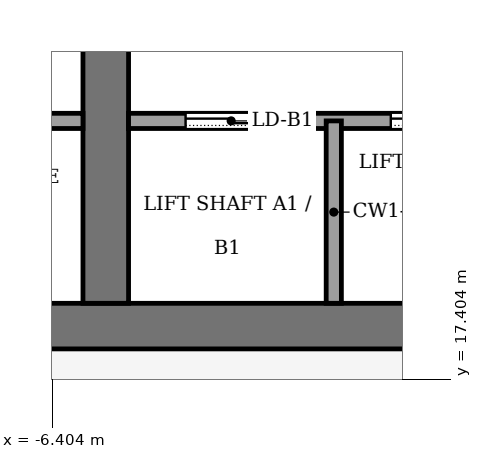
"""IFC4 building model, lengths in metres.
Left out: names, types, materials, properties, quantities, classifications, styles, units other than length and angle.
Written with IfcOpenShell. Run it as: python <this file> out.ifc"""

import sys

from ifc_helpers import new_model, si_unit, direction, frame, frame_2d, origin, place, context, subcontext, project, spatial, rectangle, extrude, element, fill, save


model = new_model("IFC4")
c1 = context("Model", 3, precision=1e-05, world=origin(), true_north=direction((0.0, 1.0)))
c2 = subcontext(c1, "Body", "Model", "MODEL_VIEW")
j1 = project(units=[si_unit("LENGTHUNIT", "METRE"), si_unit("PLANEANGLEUNIT", "RADIAN")], contexts=[c1])
p1 = place(None, origin())
s1 = spatial("IfcSite", under=j1, at=p1, CompositionType="ELEMENT")
p2 = place(p1, origin())
s2 = spatial("IfcBuilding", under=s1, at=p2, CompositionType="ELEMENT")
p3 = place(p2, frame((0.0, 0.0, 314.0)))
s3 = spatial("IfcBuildingStorey", under=s2, at=p3, CompositionType="ELEMENT", Elevation=314.0)
p4 = place(p3, frame((-13.2, 18.1, -0.13), z_axis=(0.0, 0.0, 1.0), x_axis=(1.0, 0.0, 0.0)))
e1 = element("IfcWall", 1, at=p4, inside=s3, PredefinedType="SHEAR", context=c2, shape_type="SweptSolid", body=[
    extrude(rectangle(XDim=26.4, YDim=0.6, at=frame_2d((13.2, 0.0))), origin(), (0.0, 0.0, 1.0), 4.0),
])
p5 = place(p3, frame((-5.7, 18.4, -0.13), z_axis=(0.0, 0.0, 1.0), x_axis=(0.0, 1.0, 0.0)))
e2 = element("IfcWall", 2, at=p5, inside=s3, PredefinedType="SHEAR", context=c2, shape_type="SweptSolid", body=[
    extrude(rectangle(XDim=19.2, YDim=0.6, at=frame_2d((9.6, 0.0))), origin(), (0.0, 0.0, 1.0), 4.0),
])
p6 = place(p5, frame((8.35, 0.0, 0.13)))
e3 = element("IfcOpeningElement", 3, at=p6, cuts=e2, PredefinedType="OPENING", context=c2, shape_type="SweptSolid", body=[
    extrude(rectangle(XDim=0.9, YDim=2.1, at=frame_2d((0.45, 1.05))), frame((0.0, 0.31, 0.0), z_axis=(0.0, -1.0, 0.0), x_axis=(1.0, 0.0, 0.0)), (0.0, 0.0, 1.0), 0.62),
])
p7 = place(p3, frame((-12.6, 20.8, 0.0), z_axis=(0.0, 0.0, 1.0), x_axis=(1.0, 0.0, 0.0)))
e4 = element("IfcWall", 4, at=p7, inside=s3, PredefinedType="PARTITIONING", context=c2, shape_type="SweptSolid", body=[
    extrude(rectangle(XDim=6.6, YDim=0.2, at=frame_2d((3.3, 0.0))), origin(), (0.0, 0.0, 1.0), 3.87),
])
p8 = place(p7, frame((1.15, 0.0, 0.0)))
e5 = element("IfcOpeningElement", 5, at=p8, cuts=e4, PredefinedType="OPENING", context=c2, shape_type="SweptSolid", body=[
    extrude(rectangle(XDim=1.0, YDim=2.1, at=frame_2d((0.5, 1.05))), frame((0.0, 0.11, 0.0), z_axis=(0.0, -1.0, 0.0), x_axis=(1.0, 0.0, 0.0)), (0.0, 0.0, 1.0), 0.22),
])
p9 = place(p7, frame((4.45, 0.0, 0.0)))
e6 = element("IfcOpeningElement", 6, at=p9, cuts=e4, PredefinedType="OPENING", context=c2, shape_type="SweptSolid", body=[
    extrude(rectangle(XDim=1.0, YDim=2.1, at=frame_2d((0.5, 1.05))), frame((0.0, 0.11, 0.0), z_axis=(0.0, -1.0, 0.0), x_axis=(1.0, 0.0, 0.0)), (0.0, 0.0, 1.0), 0.22),
])
p10 = place(p3, frame((-5.4, 20.8, 0.0), z_axis=(0.0, 0.0, 1.0), x_axis=(1.0, 0.0, 0.0)))
e7 = element("IfcWall", 7, at=p10, inside=s3, PredefinedType="PARTITIONING", context=c2, shape_type="SweptSolid", body=[
    extrude(rectangle(XDim=10.8, YDim=0.2, at=frame_2d((5.4, 0.0))), origin(), (0.0, 0.0, 1.0), 3.87),
])
p11 = place(p10, frame((0.75, 0.0, 0.0)))
e8 = element("IfcOpeningElement", 8, at=p11, cuts=e7, PredefinedType="OPENING", context=c2, shape_type="SweptSolid", body=[
    extrude(rectangle(XDim=1.2, YDim=2.2, at=frame_2d((0.6, 1.1))), frame((0.0, 0.11, 0.0), z_axis=(0.0, -1.0, 0.0), x_axis=(1.0, 0.0, 0.0)), (0.0, 0.0, 1.0), 0.22),
])
p12 = place(p10, frame((3.45, 0.0, 0.0)))
e9 = element("IfcOpeningElement", 9, at=p12, cuts=e7, PredefinedType="OPENING", context=c2, shape_type="SweptSolid", body=[
    extrude(rectangle(XDim=1.2, YDim=2.2, at=frame_2d((0.6, 1.1))), frame((0.0, 0.11, 0.0), z_axis=(0.0, -1.0, 0.0), x_axis=(1.0, 0.0, 0.0)), (0.0, 0.0, 1.0), 0.22),
])
p13 = place(p10, frame((6.15, 0.0, 0.0)))
e10 = element("IfcOpeningElement", 10, at=p13, cuts=e7, PredefinedType="OPENING", context=c2, shape_type="SweptSolid", body=[
    extrude(rectangle(XDim=1.2, YDim=2.2, at=frame_2d((0.6, 1.1))), frame((0.0, 0.11, 0.0), z_axis=(0.0, -1.0, 0.0), x_axis=(1.0, 0.0, 0.0)), (0.0, 0.0, 1.0), 0.22),
])
p14 = place(p10, frame((8.85, 0.0, 0.0)))
e11 = element("IfcOpeningElement", 11, at=p14, cuts=e7, PredefinedType="OPENING", context=c2, shape_type="SweptSolid", body=[
    extrude(rectangle(XDim=1.2, YDim=2.2, at=frame_2d((0.6, 1.1))), frame((0.0, 0.11, 0.0), z_axis=(0.0, -1.0, 0.0), x_axis=(1.0, 0.0, 0.0)), (0.0, 0.0, 1.0), 0.22),
])
p15 = place(p3, frame((-2.7, 18.4, 0.0), z_axis=(0.0, 0.0, 1.0), x_axis=(0.0, 1.0, 0.0)))
e12 = element("IfcWall", 12, at=p15, inside=s3, PredefinedType="PARTITIONING", context=c2, shape_type="SweptSolid", body=[
    extrude(rectangle(XDim=2.4, YDim=0.2, at=frame_2d((1.2, 0.0))), origin(), (0.0, 0.0, 1.0), 3.87),
])
p16 = place(p11, origin())
e13 = element("IfcDoor", 13, at=p16, inside=s3, OperationType="SLIDING_TO_LEFT", PredefinedType="DOOR", context=c2, shape_type="SweptSolid", body=[
    extrude(rectangle(XDim=1.2, YDim=2.2, at=frame_2d((0.6, 1.1))), frame((0.0, 0.025, 0.0), z_axis=(0.0, -1.0, 0.0), x_axis=(1.0, 0.0, 0.0)), (0.0, 0.0, 1.0), 0.05),
])
fill(e8, e13)
p17 = place(p12, origin())
e14 = element("IfcDoor", 14, at=p17, inside=s3, OperationType="SLIDING_TO_LEFT", PredefinedType="DOOR", context=c2, shape_type="SweptSolid", body=[
    extrude(rectangle(XDim=1.2, YDim=2.2, at=frame_2d((0.6, 1.1))), frame((0.0, 0.025, 0.0), z_axis=(0.0, -1.0, 0.0), x_axis=(1.0, 0.0, 0.0)), (0.0, 0.0, 1.0), 0.05),
])
fill(e9, e14)
save(model, sys.argv[1])
